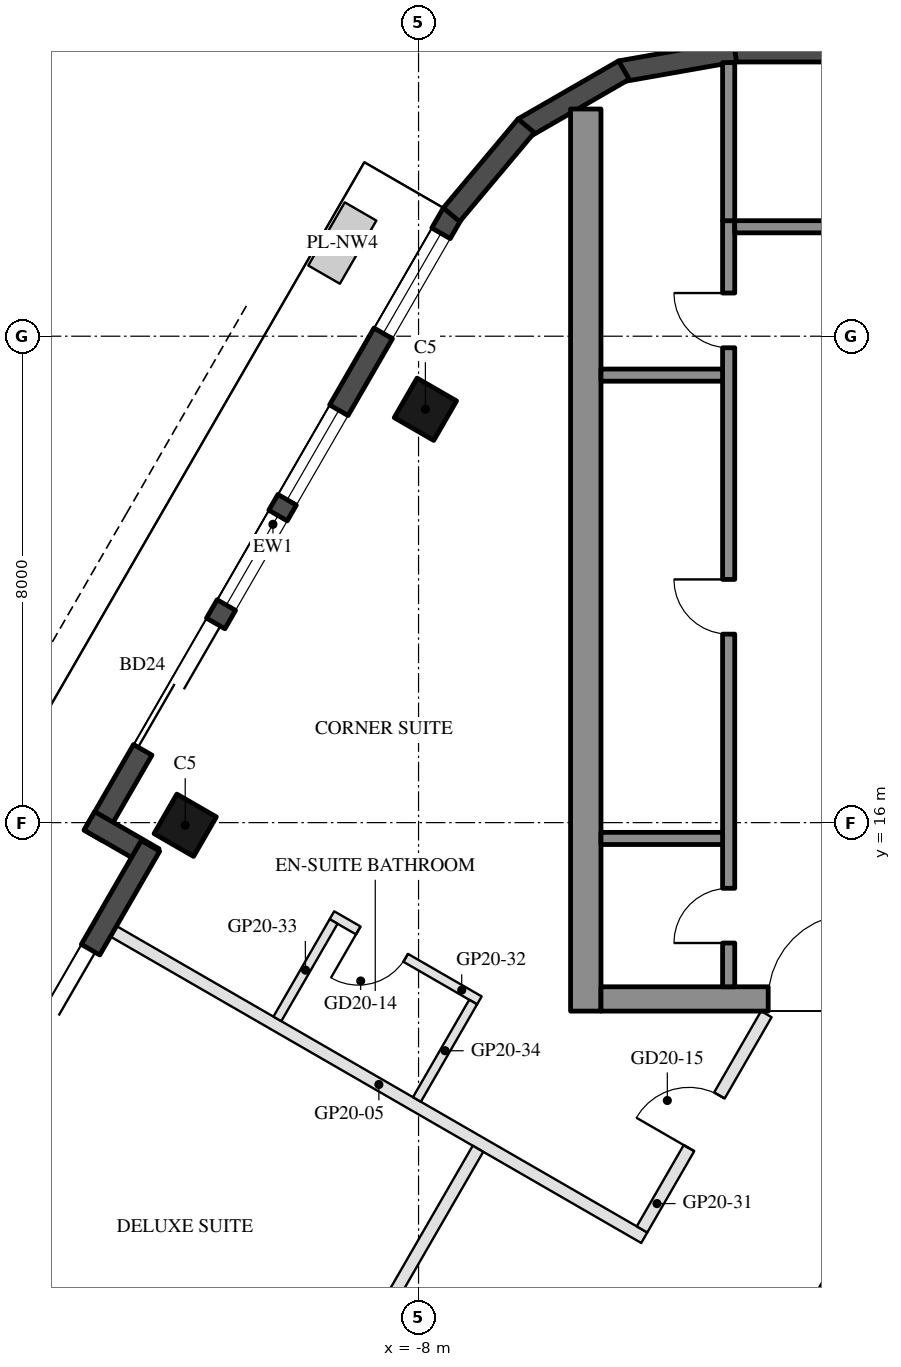
"""IFC4 building model, lengths in metres.
Left out: names, types, materials, properties, quantities, classifications, styles, units other than length and angle.
Written with IfcOpenShell. Run it as: python <this file> out.ifc"""

import sys

from ifc_helpers import new_model, si_unit, direction, frame, frame_2d, origin, origin_2d, place, context, subcontext, project, spatial, rectangle, hollow_rectangle, extrude, element, fill, save


model = new_model("IFC4")
c1 = context("Model", 3, precision=1e-05, world=origin(), true_north=direction((0.0, 1.0)))
c2 = subcontext(c1, "Body", "Model", "MODEL_VIEW")
j1 = project(units=[si_unit("LENGTHUNIT", "METRE"), si_unit("PLANEANGLEUNIT", "RADIAN")], contexts=[c1])
p1 = place(None, origin())
s1 = spatial("IfcSite", under=j1, at=p1, CompositionType="ELEMENT")
p2 = place(p1, origin())
s2 = spatial("IfcBuilding", under=s1, at=p2, CompositionType="ELEMENT")
p3 = place(p2, frame((0.0, 0.0, 213.2)))
s3 = spatial("IfcBuildingStorey", under=s2, at=p3, CompositionType="ELEMENT", Elevation=213.2)
for number, where, z_axis, x_axis in (
    (1, (-7.888, 22.798, 0.0), (0.0, 0.0, 1.0), (0.5, 0.866, 0.0)),
    (2, (-11.838, 15.957, 0.0), (0.0, 0.0, 1.0), (0.5, 0.866, 0.0)),
):
    element("IfcColumn", number, at=place(p3, frame(where, z_axis=z_axis, x_axis=x_axis)), inside=s3, PredefinedType="COLUMN", context=c2, shape_type="SweptSolid", body=[
        extrude(hollow_rectangle(XDim=0.75, YDim=0.75, WallThickness=0.035, at=origin_2d()), origin(), (0.0, 0.0, 1.0), 3.7),
    ])
p4 = place(p3, frame((-7.441, 26.022, 0.0), z_axis=(0.0, 0.0, 1.0), x_axis=(-0.499992533062, -0.86602971478, 0.0)))
e3 = element("IfcWall", 3, at=p4, inside=s3, PredefinedType="SOLIDWALL", context=c2, shape_type="SweptSolid", body=[
    extrude(rectangle(XDim=11.816, YDim=0.35, at=frame_2d((5.908, 0.0))), origin(), (0.0, 0.0, 1.0), 3.55),
])
p5 = place(p4, frame((0.381, 0.0, 0.3)))
e4 = element("IfcOpeningElement", 4, at=p5, cuts=e3, PredefinedType="OPENING", context=c2, shape_type="SweptSolid", body=[
    extrude(rectangle(XDim=1.9, YDim=2.65, at=frame_2d((0.95, 1.325))), frame((0.0, 0.185, 0.0), z_axis=(0.0, -1.0, 0.0), x_axis=(1.0, 0.0, 0.0)), (0.0, 0.0, 1.0), 0.37),
])
p6 = place(p4, frame((7.791, 0.0, 0.0)))
e5 = element("IfcOpeningElement", 5, at=p6, cuts=e3, PredefinedType="OPENING", context=c2, shape_type="SweptSolid", body=[
    extrude(rectangle(XDim=2.4, YDim=2.4, at=frame_2d((1.2, 1.2))), frame((0.0, 0.185, 0.0), z_axis=(0.0, -1.0, 0.0), x_axis=(1.0, 0.0, 0.0)), (0.0, 0.0, 1.0), 0.37),
])
p7 = place(p4, frame((3.741, 0.0, 0.3)))
e6 = element("IfcOpeningElement", 6, at=p7, cuts=e3, PredefinedType="OPENING", context=c2, shape_type="SweptSolid", body=[
    extrude(rectangle(XDim=1.7, YDim=2.65, at=frame_2d((0.85, 1.325))), frame((0.0, 0.185, 0.0), z_axis=(0.0, -1.0, 0.0), x_axis=(1.0, 0.0, 0.0)), (0.0, 0.0, 1.0), 0.37),
])
p8 = place(p4, frame((5.741, 0.0, 0.3)))
e7 = element("IfcOpeningElement", 7, at=p8, cuts=e3, PredefinedType="OPENING", context=c2, shape_type="SweptSolid", body=[
    extrude(rectangle(XDim=1.7, YDim=2.65, at=frame_2d((0.85, 1.325))), frame((0.0, 0.185, 0.0), z_axis=(0.0, -1.0, 0.0), x_axis=(1.0, 0.0, 0.0)), (0.0, 0.0, 1.0), 0.37),
])
p9 = place(p3, frame((-13.413, 16.029, 0.0), z_axis=(0.0, 0.0, 1.0), x_axis=(0.866005645448, -0.500034220881, 0.0)))
e8 = element("IfcWall", 8, at=p9, inside=s3, PredefinedType="SOLIDWALL", context=c2, shape_type="SweptSolid", body=[
    extrude(rectangle(XDim=1.22, YDim=0.35, at=frame_2d((0.61, 0.0))), origin(), (0.0, 0.0, 1.0), 3.55),
])
p10 = place(p3, frame((-12.409, 15.617, 0.0), z_axis=(0.0, 0.0, 1.0), x_axis=(-0.500003597184, -0.866023326939, 0.0)))
e9 = element("IfcWall", 9, at=p10, inside=s3, PredefinedType="SOLIDWALL", context=c2, shape_type="SweptSolid", body=[
    extrude(rectangle(XDim=6.74, YDim=0.35, at=frame_2d((3.37, 0.0))), origin(), (0.0, 0.0, 1.0), 3.55),
])
p11 = place(p10, frame((1.97, 0.0, 0.0)))
e10 = element("IfcOpeningElement", 10, at=p11, cuts=e9, PredefinedType="OPENING", context=c2, shape_type="SweptSolid", body=[
    extrude(rectangle(XDim=2.4, YDim=2.4, at=frame_2d((1.2, 1.2))), frame((0.0, 0.185, 0.0), z_axis=(0.0, -1.0, 0.0), x_axis=(1.0, 0.0, 0.0)), (0.0, 0.0, 1.0), 0.37),
])
p12 = place(p10, frame((4.67, 0.0, 0.3)))
e11 = element("IfcOpeningElement", 11, at=p12, cuts=e9, PredefinedType="OPENING", context=c2, shape_type="SweptSolid", body=[
    extrude(rectangle(XDim=1.2, YDim=2.65, at=frame_2d((0.6, 1.325))), frame((0.0, 0.185, 0.0), z_axis=(0.0, -1.0, 0.0), x_axis=(1.0, 0.0, 0.0)), (0.0, 0.0, 1.0), 0.37),
])
p13 = place(p3, frame((2.829, 28.685, 0.0), z_axis=(0.0, 0.0, 1.0), x_axis=(-1.0, 0.0, 0.0)))
e12 = element("IfcWall", 12, at=p13, inside=s3, PredefinedType="SOLIDWALL", context=c2, shape_type="SweptSolid", body=[
    extrude(rectangle(XDim=5.658, YDim=0.35, at=frame_2d((2.829, 0.0))), origin(), (0.0, 0.0, 1.0), 3.55),
])
for number, where, z_axis, x_axis in (
    (13, (-2.799, 28.688, 0.0), (0.0, 0.0, 1.0), (-0.985, -0.174, 0.0)),
    (14, (-4.623, 28.377, 0.0), (0.0, 0.0, 1.0), (-0.866, -0.5, 0.0)),
):
    element("IfcWall", number, at=place(p3, frame(where, z_axis=z_axis, x_axis=x_axis)), inside=s3, PredefinedType="SOLIDWALL", context=c2, shape_type="SweptSolid", body=[
        extrude(rectangle(XDim=1.91, YDim=0.35, at=frame_2d((0.955, 0.0))), origin(), (0.0, 0.0, 1.0), 3.55),
    ])
p14 = place(p3, frame((-6.23, 27.461, 0.0), z_axis=(0.0, 0.0, 1.0), x_axis=(-0.642808304945, -0.766027077259, 0.0)))
e15 = element("IfcWall", 15, at=p14, inside=s3, PredefinedType="SOLIDWALL", context=c2, shape_type="SweptSolid", body=[
    extrude(rectangle(XDim=1.91, YDim=0.35, at=frame_2d((0.955, 0.0))), origin(), (0.0, 0.0, 1.0), 3.55),
])
p15 = place(p3, frame((-5.25, 12.9, 0.0), z_axis=(0.0, 0.0, 1.0), x_axis=(0.0, 1.0, 0.0)))
e16 = element("IfcWall", 16, at=p15, inside=s3, PredefinedType="SHEAR", context=c2, shape_type="SweptSolid", body=[
    extrude(rectangle(XDim=14.837, YDim=0.5, at=frame_2d((7.418, 0.0))), origin(), (0.0, 0.0, 1.0), 3.5),
])
p16 = place(p3, frame((5.0, 13.1, 0.0), z_axis=(0.0, 0.0, 1.0), x_axis=(-1.0, 0.0, 0.0)))
e17 = element("IfcWall", 17, at=p16, inside=s3, PredefinedType="SHEAR", context=c2, shape_type="SweptSolid", body=[
    extrude(rectangle(XDim=10.0, YDim=0.4, at=frame_2d((5.0, 0.0))), origin(), (0.0, 0.0, 1.0), 3.5),
])
p17 = place(p16, frame((3.55, 0.0, 0.0)))
e18 = element("IfcOpeningElement", 18, at=p17, cuts=e17, PredefinedType="OPENING", context=c2, shape_type="SweptSolid", body=[
    extrude(rectangle(XDim=1.1, YDim=2.1, at=frame_2d((0.55, 1.05))), frame((0.0, 0.21, 0.0), z_axis=(0.0, -1.0, 0.0), x_axis=(1.0, 0.0, 0.0)), (0.0, 0.0, 1.0), 0.42),
])
p18 = place(p16, frame((5.85, 0.0, 0.0)))
e19 = element("IfcOpeningElement", 19, at=p18, cuts=e17, PredefinedType="OPENING", context=c2, shape_type="SweptSolid", body=[
    extrude(rectangle(XDim=1.4, YDim=2.1, at=frame_2d((0.7, 1.05))), frame((0.0, 0.21, 0.0), z_axis=(0.0, -1.0, 0.0), x_axis=(1.0, 0.0, 0.0)), (0.0, 0.0, 1.0), 0.42),
])
p19 = place(p3, frame((-2.9, 13.3, 0.0), z_axis=(0.0, 0.0, 1.0), x_axis=(0.0, 1.0, 0.0)))
e20 = element("IfcWall", 20, at=p19, inside=s3, PredefinedType="SHEAR", context=c2, shape_type="SweptSolid", body=[
    extrude(rectangle(XDim=12.6, YDim=0.2, at=frame_2d((6.3, 0.0))), origin(), (0.0, 0.0, 1.0), 3.5),
])
p20 = place(p19, frame((0.72, 0.0, 0.0)))
e21 = element("IfcOpeningElement", 21, at=p20, cuts=e20, PredefinedType="OPENING", context=c2, shape_type="SweptSolid", body=[
    extrude(rectangle(XDim=0.9, YDim=2.1, at=frame_2d((0.45, 1.05))), frame((0.0, 0.11, 0.0), z_axis=(0.0, -1.0, 0.0), x_axis=(1.0, 0.0, 0.0)), (0.0, 0.0, 1.0), 0.22),
])
p21 = place(p19, frame((5.8, 0.0, 0.0)))
e22 = element("IfcOpeningElement", 22, at=p21, cuts=e20, PredefinedType="OPENING", context=c2, shape_type="SweptSolid", body=[
    extrude(rectangle(XDim=0.9, YDim=2.1, at=frame_2d((0.45, 1.05))), frame((0.0, 0.11, 0.0), z_axis=(0.0, -1.0, 0.0), x_axis=(1.0, 0.0, 0.0)), (0.0, 0.0, 1.0), 0.22),
])
p22 = place(p19, frame((10.51, 0.0, 0.0)))
e23 = element("IfcOpeningElement", 23, at=p22, cuts=e20, PredefinedType="OPENING", context=c2, shape_type="SweptSolid", body=[
    extrude(rectangle(XDim=0.9, YDim=2.1, at=frame_2d((0.45, 1.05))), frame((0.0, 0.11, 0.0), z_axis=(0.0, -1.0, 0.0), x_axis=(1.0, 0.0, 0.0)), (0.0, 0.0, 1.0), 0.22),
])
p23 = place(p3, frame((-0.4, 25.8, 0.0), z_axis=(0.0, 0.0, 1.0), x_axis=(-1.0, 0.0, 0.0)))
e24 = element("IfcWall", 24, at=p23, inside=s3, PredefinedType="SHEAR", context=c2, shape_type="SweptSolid", body=[
    extrude(rectangle(XDim=2.4, YDim=0.2, at=frame_2d((1.2, 0.0))), origin(), (0.0, 0.0, 1.0), 3.5),
])
for number, where, z_axis, x_axis in (
    (25, (-3.0, 15.74, 0.0), (0.0, 0.0, 1.0), (-1.0, 0.0, 0.0)),
    (26, (-3.0, 23.36, 0.0), (0.0, 0.0, 1.0), (-1.0, 0.0, 0.0)),
):
    element("IfcWall", number, at=place(p3, frame(where, z_axis=z_axis, x_axis=x_axis)), inside=s3, PredefinedType="SHEAR", context=c2, shape_type="SweptSolid", body=[
        extrude(rectangle(XDim=2.0, YDim=0.2, at=frame_2d((1.0, 0.0))), origin(), (0.0, 0.0, 1.0), 3.5),
    ])
p24 = place(p3, frame((-2.9, 25.9, 0.0), z_axis=(0.0, 0.0, 1.0), x_axis=(0.0, 1.0, 0.0)))
e27 = element("IfcWall", 27, at=p24, inside=s3, PredefinedType="SHEAR", context=c2, shape_type="SweptSolid", body=[
    extrude(rectangle(XDim=2.6, YDim=0.2, at=frame_2d((1.3, 0.0))), origin(), (0.0, 0.0, 1.0), 3.5),
])
p25 = place(p3, frame((-13.018, 14.213, 0.0), z_axis=(0.0, 0.0, 1.0), x_axis=(0.866022637375, -0.500004791531, 0.0)))
e28 = element("IfcWall", 28, at=p25, inside=s3, PredefinedType="PARTITIONING", context=c2, shape_type="SweptSolid", body=[
    extrude(rectangle(XDim=10.08, YDim=0.2, at=frame_2d((5.04, 0.0))), origin(), (0.0, 0.0, 1.0), 3.06),
])
p26 = place(p3, frame((-4.325, 9.31, 0.0), z_axis=(0.0, 0.0, 1.0), x_axis=(0.500011931275, 0.86601851515, 0.0)))
e29 = element("IfcWall", 29, at=p26, inside=s3, PredefinedType="PARTITIONING", context=c2, shape_type="SweptSolid", body=[
    extrude(rectangle(XDim=4.088, YDim=0.2, at=frame_2d((2.044, 0.0))), origin(), (0.0, 0.0, 1.0), 2.95),
])
p27 = place(p26, frame((1.544, 0.0, 0.0)))
e30 = element("IfcOpeningElement", 30, at=p27, cuts=e29, PredefinedType="OPENING", context=c2, shape_type="SweptSolid", body=[
    extrude(rectangle(XDim=1.0, YDim=2.1, at=frame_2d((0.5, 1.05))), frame((0.0, 0.11, 0.0), z_axis=(0.0, -1.0, 0.0), x_axis=(1.0, 0.0, 0.0)), (0.0, 0.0, 1.0), 0.22),
])
p28 = place(p3, frame((-7.0, 13.077, 0.0), z_axis=(0.0, 0.0, 1.0), x_axis=(-0.866034573852, 0.49998411664, 0.0)))
e31 = element("IfcWall", 31, at=p28, inside=s3, PredefinedType="PARTITIONING", context=c2, shape_type="SweptSolid", body=[
    extrude(rectangle(XDim=2.8, YDim=0.15, at=frame_2d((1.4, 0.0))), origin(), (0.0, 0.0, 1.0), 2.95),
])
p29 = place(p28, frame((1.4, 0.0, 0.0)))
e32 = element("IfcOpeningElement", 32, at=p29, cuts=e31, PredefinedType="OPENING", context=c2, shape_type="SweptSolid", body=[
    extrude(rectangle(XDim=0.9, YDim=2.1, at=frame_2d((0.45, 1.05))), frame((0.0, 0.085, 0.0), z_axis=(0.0, -1.0, 0.0), x_axis=(1.0, 0.0, 0.0)), (0.0, 0.0, 1.0), 0.17),
])
for number, where, z_axis, x_axis in (
    (33, (-9.397, 14.374, 0.0), (0.0, 0.0, 1.0), (-0.5, -0.866, 0.0)),
    (34, (-7.102, 13.049, 0.0), (0.0, 0.0, 1.0), (-0.5, -0.866, 0.0)),
):
    element("IfcWall", number, at=place(p3, frame(where, z_axis=z_axis, x_axis=x_axis)), inside=s3, PredefinedType="PARTITIONING", context=c2, shape_type="SweptSolid", body=[
        extrude(rectangle(XDim=1.85, YDim=0.15, at=frame_2d((0.925, 0.0))), origin(), (0.0, 0.0, 1.0), 3.55),
    ])
p30 = place(p3, frame((-12.223, 1.63, 0.0), z_axis=(0.0, 0.0, 1.0), x_axis=(0.499999493275, 0.866025696342, 0.0)))
e35 = element("IfcWall", 35, at=p30, inside=s3, PredefinedType="PARTITIONING", context=c2, shape_type="SweptSolid", body=[
    extrude(rectangle(XDim=10.4, YDim=0.2, at=frame_2d((5.2, 0.0))), origin(), (0.0, 0.0, 1.0), 2.95),
])
p31 = place(p30, frame((2.45, 0.0, 0.0)))
e36 = element("IfcOpeningElement", 36, at=p31, cuts=e35, PredefinedType="OPENING", context=c2, shape_type="SweptSolid", body=[
    extrude(rectangle(XDim=1.0, YDim=2.1, at=frame_2d((0.5, 1.05))), frame((0.0, 0.11, 0.0), z_axis=(0.0, -1.0, 0.0), x_axis=(1.0, 0.0, 0.0)), (0.0, 0.0, 1.0), 0.22),
])
p32 = place(p5, origin())
e37 = element("IfcWindow", 37, at=p32, inside=s3, PartitioningType="SINGLE_PANEL", PredefinedType="WINDOW", context=c2, shape_type="SweptSolid", body=[
    extrude(rectangle(XDim=1.9, YDim=2.65, at=frame_2d((0.95, 1.325))), frame((0.0, 0.03, 0.0), z_axis=(0.0, -1.0, 0.0), x_axis=(1.0, 0.0, 0.0)), (0.0, 0.0, 1.0), 0.06),
])
fill(e4, e37)
p33 = place(p6, frame((2.4, 0.0, 0.0), z_axis=(0.0, 0.0, 1.0), x_axis=(-1.0, 0.0, 0.0)))
e38 = element("IfcDoor", 38, at=p33, inside=s3, OperationType="SLIDING_TO_LEFT", PredefinedType="DOOR", context=c2, shape_type="SweptSolid", body=[
    extrude(rectangle(XDim=2.4, YDim=2.4, at=frame_2d((1.2, 1.2))), frame((0.0, 0.025, 0.0), z_axis=(0.0, -1.0, 0.0), x_axis=(1.0, 0.0, 0.0)), (0.0, 0.0, 1.0), 0.05),
])
fill(e5, e38)
p34 = place(p7, origin())
e39 = element("IfcWindow", 39, at=p34, inside=s3, PartitioningType="SINGLE_PANEL", PredefinedType="WINDOW", context=c2, shape_type="SweptSolid", body=[
    extrude(rectangle(XDim=1.7, YDim=2.65, at=frame_2d((0.85, 1.325))), frame((0.0, 0.03, 0.0), z_axis=(0.0, -1.0, 0.0), x_axis=(1.0, 0.0, 0.0)), (0.0, 0.0, 1.0), 0.06),
])
fill(e6, e39)
p35 = place(p8, origin())
e40 = element("IfcWindow", 40, at=p35, inside=s3, PartitioningType="SINGLE_PANEL", PredefinedType="WINDOW", context=c2, shape_type="SweptSolid", body=[
    extrude(rectangle(XDim=1.7, YDim=2.65, at=frame_2d((0.85, 1.325))), frame((0.0, 0.03, 0.0), z_axis=(0.0, -1.0, 0.0), x_axis=(1.0, 0.0, 0.0)), (0.0, 0.0, 1.0), 0.06),
])
fill(e7, e40)
p36 = place(p11, frame((2.4, 0.0, 0.0), z_axis=(0.0, 0.0, 1.0), x_axis=(-1.0, 0.0, 0.0)))
e41 = element("IfcDoor", 41, at=p36, inside=s3, OperationType="SLIDING_TO_LEFT", PredefinedType="DOOR", context=c2, shape_type="SweptSolid", body=[
    extrude(rectangle(XDim=2.4, YDim=2.4, at=frame_2d((1.2, 1.2))), frame((0.0, 0.025, 0.0), z_axis=(0.0, -1.0, 0.0), x_axis=(1.0, 0.0, 0.0)), (0.0, 0.0, 1.0), 0.05),
])
fill(e10, e41)
p37 = place(p20, origin())
e42 = element("IfcDoor", 42, at=p37, inside=s3, OperationType="SINGLE_SWING_LEFT", PredefinedType="DOOR", context=c2, shape_type="SweptSolid", body=[
    extrude(rectangle(XDim=0.9, YDim=2.1, at=frame_2d((0.45, 1.05))), frame((0.0, 0.025, 0.0), z_axis=(0.0, -1.0, 0.0), x_axis=(1.0, 0.0, 0.0)), (0.0, 0.0, 1.0), 0.05),
])
fill(e21, e42)
p38 = place(p21, origin())
e43 = element("IfcDoor", 43, at=p38, inside=s3, OperationType="SINGLE_SWING_RIGHT", PredefinedType="DOOR", context=c2, shape_type="SweptSolid", body=[
    extrude(rectangle(XDim=0.9, YDim=2.1, at=frame_2d((0.45, 1.05))), frame((0.0, 0.025, 0.0), z_axis=(0.0, -1.0, 0.0), x_axis=(1.0, 0.0, 0.0)), (0.0, 0.0, 1.0), 0.05),
])
fill(e22, e43)
p39 = place(p22, origin())
e44 = element("IfcDoor", 44, at=p39, inside=s3, OperationType="SINGLE_SWING_RIGHT", PredefinedType="DOOR", context=c2, shape_type="SweptSolid", body=[
    extrude(rectangle(XDim=0.9, YDim=2.1, at=frame_2d((0.45, 1.05))), frame((0.0, 0.025, 0.0), z_axis=(0.0, -1.0, 0.0), x_axis=(1.0, 0.0, 0.0)), (0.0, 0.0, 1.0), 0.05),
])
fill(e23, e44)
p40 = place(p18, frame((1.4, 0.0, 0.0), z_axis=(0.0, 0.0, 1.0), x_axis=(-1.0, 0.0, 0.0)))
e45 = element("IfcDoor", 45, at=p40, inside=s3, OperationType="DOUBLE_DOOR_SINGLE_SWING", PredefinedType="DOOR", context=c2, shape_type="SweptSolid", body=[
    extrude(rectangle(XDim=1.4, YDim=2.1, at=frame_2d((0.7, 1.05))), frame((0.0, 0.025, 0.0), z_axis=(0.0, -1.0, 0.0), x_axis=(1.0, 0.0, 0.0)), (0.0, 0.0, 1.0), 0.05),
])
fill(e19, e45)
p41 = place(p29, origin())
e46 = element("IfcDoor", 46, at=p41, inside=s3, OperationType="SINGLE_SWING_RIGHT", PredefinedType="DOOR", context=c2, shape_type="SweptSolid", body=[
    extrude(rectangle(XDim=0.9, YDim=2.1, at=frame_2d((0.45, 1.05))), frame((0.0, 0.025, 0.0), z_axis=(0.0, -1.0, 0.0), x_axis=(1.0, 0.0, 0.0)), (0.0, 0.0, 1.0), 0.05),
])
fill(e32, e46)
p42 = place(p27, origin())
e47 = element("IfcDoor", 47, at=p42, inside=s3, OperationType="SINGLE_SWING_LEFT", PredefinedType="DOOR", context=c2, shape_type="SweptSolid", body=[
    extrude(rectangle(XDim=1.0, YDim=2.1, at=frame_2d((0.5, 1.05))), frame((0.0, 0.025, 0.0), z_axis=(0.0, -1.0, 0.0), x_axis=(1.0, 0.0, 0.0)), (0.0, 0.0, 1.0), 0.05),
])
fill(e30, e47)
save(model, sys.argv[1])
